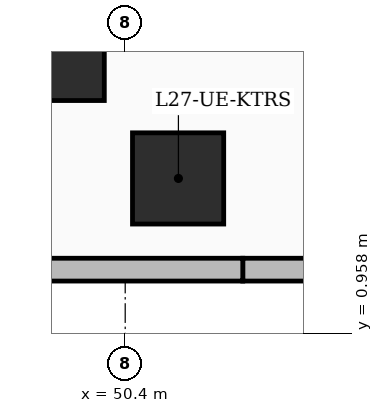
"""IFC4 building model, lengths in metres.
Left out: names, types, materials, properties, quantities, classifications, styles, units other than length and angle.
Written with IfcOpenShell. Run it as: python <this file> out.ifc"""

import sys

from ifc_helpers import new_model, si_unit, direction, frame, frame_2d, origin, origin_2d, place, context, subcontext, project, spatial, rectangle, extrude, element, save


model = new_model("IFC4")
c1 = context("Model", 3, precision=1e-05, world=origin(), true_north=direction((0.0, 1.0)))
c2 = subcontext(c1, "Body", "Model", "MODEL_VIEW")
j1 = project(units=[si_unit("LENGTHUNIT", "METRE"), si_unit("PLANEANGLEUNIT", "RADIAN")], contexts=[c1])
p1 = place(None, origin())
s1 = spatial("IfcSite", under=j1, at=p1, CompositionType="ELEMENT")
p2 = place(p1, origin())
s2 = spatial("IfcBuilding", under=s1, at=p2, CompositionType="ELEMENT")
p3 = place(p2, frame((0.0, 0.0, 110.4)))
s3 = spatial("IfcBuildingStorey", under=s2, at=p3, CompositionType="ELEMENT", Elevation=110.4)
p4 = place(p3, frame((49.6, 4.55, 0.0), z_axis=(0.0, 0.0, 1.0), x_axis=(1.0, 0.0, 0.0)))
e1 = element("IfcColumn", 1, at=p4, inside=s3, PredefinedType="COLUMN", context=c2, shape_type="SweptSolid", body=[
    extrude(rectangle(XDim=1.05, YDim=1.05, at=origin_2d()), origin(), (0.0, 0.0, 1.0), 3.6),
])
p5 = place(p3, frame((51.096, 3.0, 0.0), z_axis=(0.0, 0.0, 1.0), x_axis=(1.0, 0.0, 0.0)))
e2 = element("IfcColumn", 2, at=p5, inside=s3, PredefinedType="COLUMN", context=c2, shape_type="SweptSolid", body=[
    extrude(rectangle(XDim=1.2, YDim=1.2, at=origin_2d()), origin(), (0.0, 0.0, 1.0), 3.6),
])
p6 = place(p3, frame((58.35, 1.8, 0.0), z_axis=(0.0, 0.0, 1.0), x_axis=(-1.0, 0.0, 0.0)))
e3 = element("IfcWall", 3, at=p6, inside=s3, PredefinedType="SOLIDWALL", context=c2, shape_type="SweptSolid", body=[
    extrude(rectangle(XDim=6.403, YDim=0.3, at=frame_2d((3.202, 0.0))), origin(), (0.0, 0.0, 1.0), 3.35),
])
p7 = place(p6, frame((2.735, 0.0, 0.6)))
e4 = element("IfcOpeningElement", 4, at=p7, cuts=e3, PredefinedType="OPENING", context=c2, shape_type="SweptSolid", body=[
    extrude(rectangle(XDim=2.4, YDim=2.1, at=frame_2d((1.2, 1.05))), frame((0.0, 0.16, 0.0), z_axis=(0.0, -1.0, 0.0), x_axis=(1.0, 0.0, 0.0)), (0.0, 0.0, 1.0), 0.32),
])
p8 = place(p3, frame((51.947, 1.8, 0.0), z_axis=(0.0, 0.0, 1.0), x_axis=(-1.0, 0.0, 0.0)))
e5 = element("IfcWall", 5, at=p8, inside=s3, PredefinedType="SOLIDWALL", context=c2, shape_type="SweptSolid", body=[
    extrude(rectangle(XDim=6.993, YDim=0.3, at=frame_2d((3.497, 0.0))), origin(), (0.0, 0.0, 1.0), 3.35),
])
p9 = place(p8, frame((3.225, 0.0, 0.55)))
e6 = element("IfcOpeningElement", 6, at=p9, cuts=e5, PredefinedType="OPENING", context=c2, shape_type="SweptSolid", body=[
    extrude(rectangle(XDim=2.1, YDim=2.4, at=frame_2d((1.05, 1.2))), frame((0.0, 0.16, 0.0), z_axis=(0.0, -1.0, 0.0), x_axis=(1.0, 0.0, 0.0)), (0.0, 0.0, 1.0), 0.32),
])
save(model, sys.argv[1])
